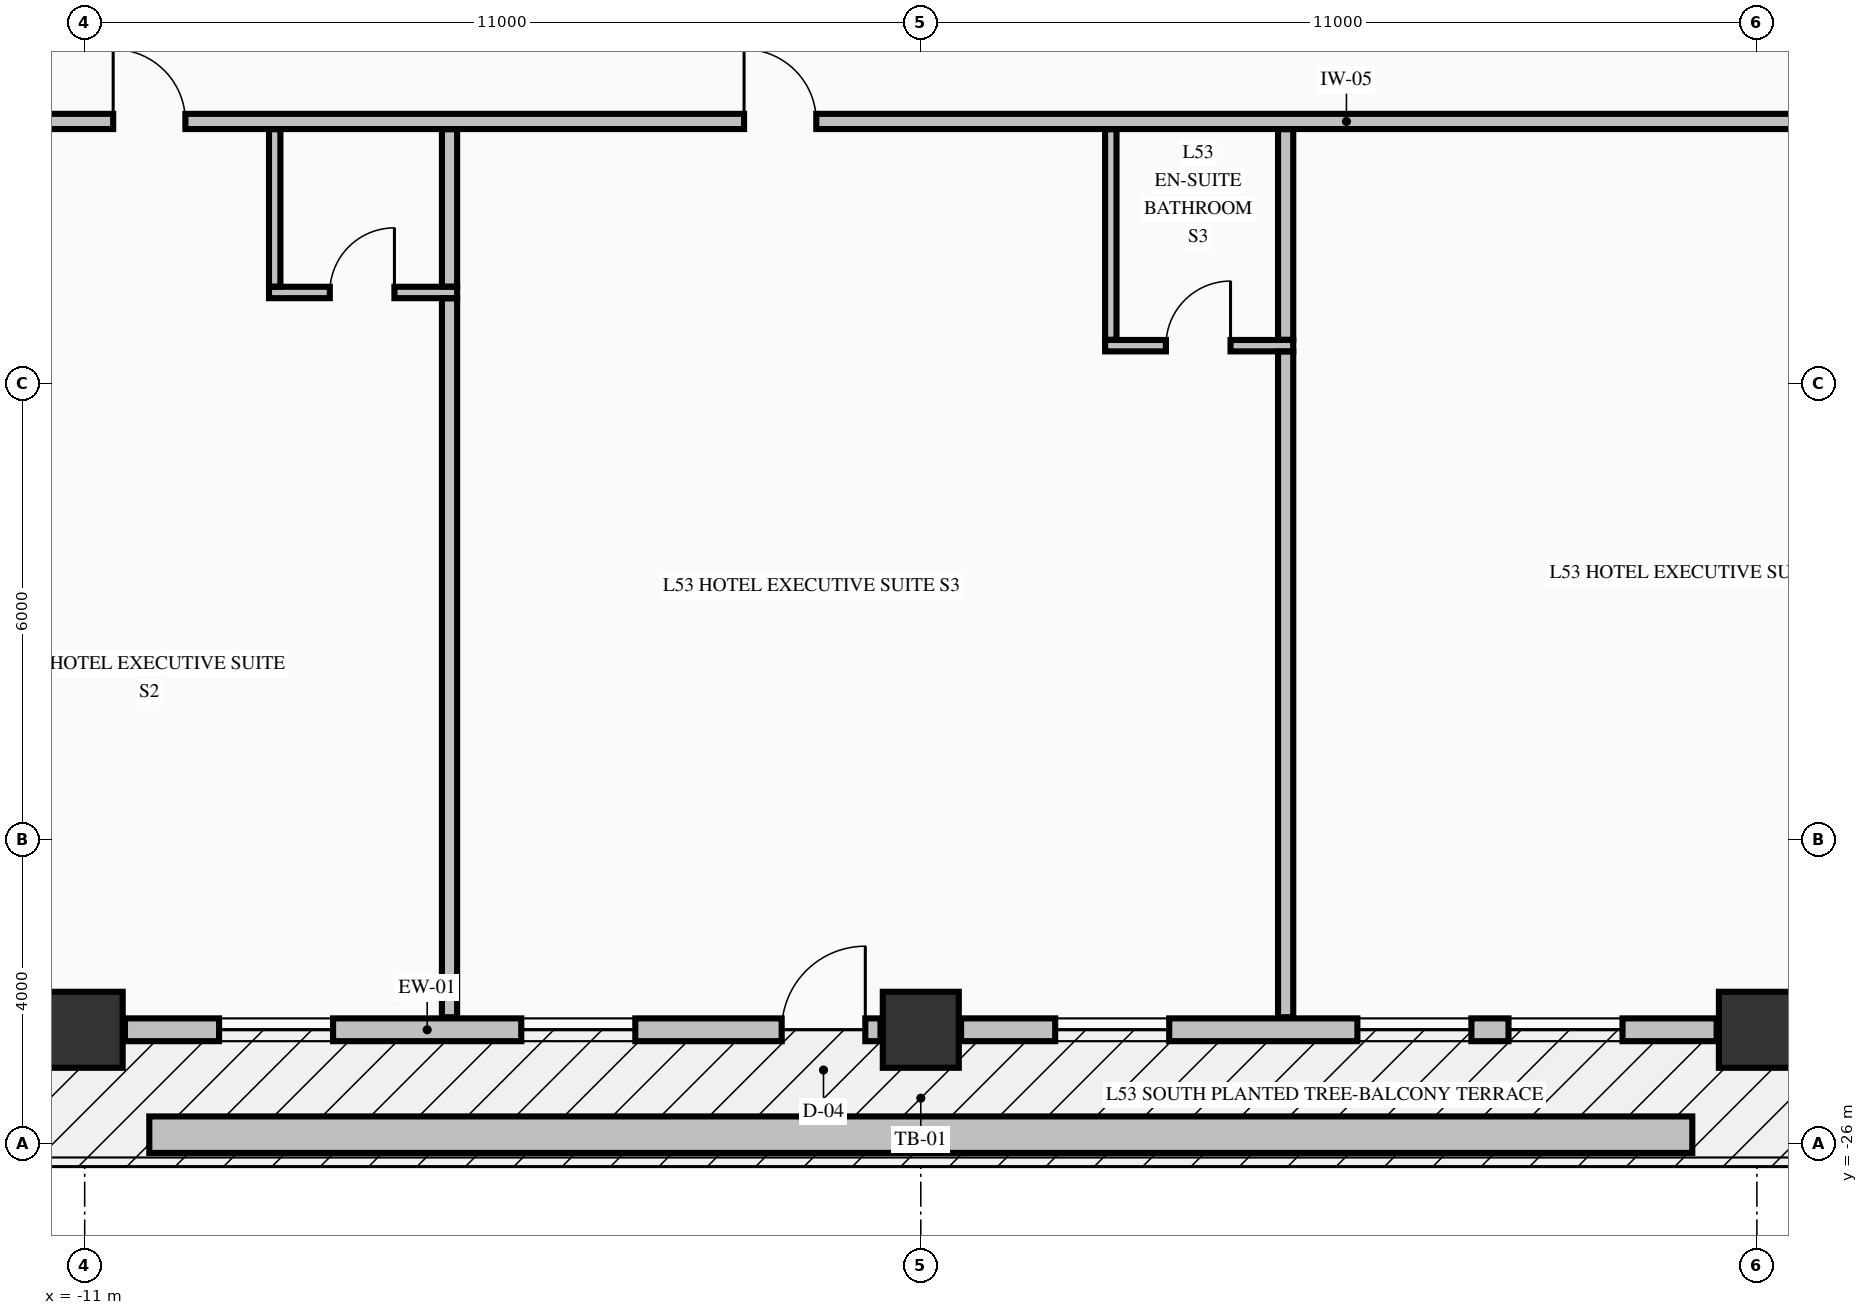
"""IFC4 building model, lengths in metres.
Left out: names, types, materials, properties, quantities, classifications, styles, units other than length and angle.
Written with IfcOpenShell. Run it as: python <this file> out.ifc"""

import sys

from ifc_helpers import new_model, si_unit, direction, frame, frame_2d, origin, origin_2d, place, context, subcontext, project, spatial, rectangle, extrude, element, fill, save


model = new_model("IFC4")
c1 = context("Model", 3, precision=1e-05, world=origin(), true_north=direction((0.0, 1.0)))
c2 = subcontext(c1, "Body", "Model", "MODEL_VIEW")
j1 = project(units=[si_unit("LENGTHUNIT", "METRE"), si_unit("PLANEANGLEUNIT", "RADIAN")], contexts=[c1])
p1 = place(None, origin())
s1 = spatial("IfcSite", under=j1, at=p1, CompositionType="ELEMENT")
p2 = place(p1, origin())
s2 = spatial("IfcBuilding", under=s1, at=p2, CompositionType="ELEMENT")
p3 = place(p2, frame((0.0, 0.0, 205.06)))
s3 = spatial("IfcBuildingStorey", under=s2, at=p3, CompositionType="ELEMENT", Elevation=205.06)
for number, where, z_axis, x_axis in (
    (1, (-11.0, -24.5, -0.25), (0.0, 0.0, 1.0), (1.0, 0.0, 0.0)),
    (2, (0.0, -24.5, -0.25), (0.0, 0.0, 1.0), (1.0, 0.0, 0.0)),
    (3, (11.0, -24.5, -0.25), (0.0, 0.0, 1.0), (1.0, 0.0, 0.0)),
):
    element("IfcColumn", number, at=place(p3, frame(where, z_axis=z_axis, x_axis=x_axis)), inside=s3, PredefinedType="COLUMN", context=c2, shape_type="SweptSolid", body=[
        extrude(rectangle(XDim=1.0, YDim=1.0, at=origin_2d()), origin(), (0.0, 0.0, 1.0), 3.4),
    ])
p4 = place(p3, frame((-10.47, -24.5, 0.0), z_axis=(0.0, 0.0, 1.0), x_axis=(1.0, 0.0, 0.0)))
e4 = element("IfcWall", 4, at=p4, inside=s3, PredefinedType="STANDARD", context=c2, shape_type="SweptSolid", body=[
    extrude(rectangle(XDim=9.94, YDim=0.3, at=frame_2d((4.97, 0.0))), origin(), (0.0, 0.0, 1.0), 2.542),
])
p5 = place(p4, frame((8.64, 0.0, 0.0)))
e5 = element("IfcOpeningElement", 5, at=p5, cuts=e4, PredefinedType="OPENING", context=c2, shape_type="SweptSolid", body=[
    extrude(rectangle(XDim=1.1, YDim=2.15, at=frame_2d((0.55, 1.075))), frame((0.0, 0.16, 0.0), z_axis=(0.0, -1.0, 0.0), x_axis=(1.0, 0.0, 0.0)), (0.0, 0.0, 1.0), 0.32),
])
p6 = place(p4, frame((1.238, 0.0, 0.72)))
e6 = element("IfcOpeningElement", 6, at=p6, cuts=e4, PredefinedType="OPENING", context=c2, shape_type="SweptSolid", body=[
    extrude(rectangle(XDim=1.5, YDim=1.6, at=frame_2d((0.75, 0.8))), frame((0.0, 0.16, 0.0), z_axis=(0.0, -1.0, 0.0), x_axis=(1.0, 0.0, 0.0)), (0.0, 0.0, 1.0), 0.32),
])
p7 = place(p4, frame((5.214, 0.0, 0.72)))
e7 = element("IfcOpeningElement", 7, at=p7, cuts=e4, PredefinedType="OPENING", context=c2, shape_type="SweptSolid", body=[
    extrude(rectangle(XDim=1.5, YDim=1.6, at=frame_2d((0.75, 0.8))), frame((0.0, 0.16, 0.0), z_axis=(0.0, -1.0, 0.0), x_axis=(1.0, 0.0, 0.0)), (0.0, 0.0, 1.0), 0.32),
])
p8 = place(p3, frame((0.53, -24.5, 0.0), z_axis=(0.0, 0.0, 1.0), x_axis=(1.0, 0.0, 0.0)))
e8 = element("IfcWall", 8, at=p8, inside=s3, PredefinedType="STANDARD", context=c2, shape_type="SweptSolid", body=[
    extrude(rectangle(XDim=9.94, YDim=0.3, at=frame_2d((4.97, 0.0))), origin(), (0.0, 0.0, 1.0), 2.542),
])
p9 = place(p8, frame((1.238, 0.0, 0.72)))
e9 = element("IfcOpeningElement", 9, at=p9, cuts=e8, PredefinedType="OPENING", context=c2, shape_type="SweptSolid", body=[
    extrude(rectangle(XDim=1.5, YDim=1.6, at=frame_2d((0.75, 0.8))), frame((0.0, 0.16, 0.0), z_axis=(0.0, -1.0, 0.0), x_axis=(1.0, 0.0, 0.0)), (0.0, 0.0, 1.0), 0.32),
])
p10 = place(p8, frame((5.214, 0.0, 0.72)))
e10 = element("IfcOpeningElement", 10, at=p10, cuts=e8, PredefinedType="OPENING", context=c2, shape_type="SweptSolid", body=[
    extrude(rectangle(XDim=1.5, YDim=1.6, at=frame_2d((0.75, 0.8))), frame((0.0, 0.16, 0.0), z_axis=(0.0, -1.0, 0.0), x_axis=(1.0, 0.0, 0.0)), (0.0, 0.0, 1.0), 0.32),
])
p11 = place(p8, frame((7.202, 0.0, 0.72)))
e11 = element("IfcOpeningElement", 11, at=p11, cuts=e8, PredefinedType="OPENING", context=c2, shape_type="SweptSolid", body=[
    extrude(rectangle(XDim=1.5, YDim=1.6, at=frame_2d((0.75, 0.8))), frame((0.0, 0.16, 0.0), z_axis=(0.0, -1.0, 0.0), x_axis=(1.0, 0.0, 0.0)), (0.0, 0.0, 1.0), 0.32),
])
p12 = place(p3, frame((2.425, -15.5, 0.0), z_axis=(0.0, 0.0, 1.0), x_axis=(1.0, 0.0, 0.0)))
e12 = element("IfcWall", 12, at=p12, inside=s3, PredefinedType="PARTITIONING", context=c2, shape_type="SweptSolid", body=[
    extrude(rectangle(XDim=2.475, YDim=0.15, at=frame_2d((1.237, 0.0))), origin(), (0.0, 0.0, 1.0), 3.15),
])
p13 = place(p12, frame((0.8, 0.0, 0.0)))
e13 = element("IfcOpeningElement", 13, at=p13, cuts=e12, PredefinedType="OPENING", context=c2, shape_type="SweptSolid", body=[
    extrude(rectangle(XDim=0.85, YDim=2.1, at=frame_2d((0.425, 1.05))), frame((0.0, 0.085, 0.0), z_axis=(0.0, -1.0, 0.0), x_axis=(1.0, 0.0, 0.0)), (0.0, 0.0, 1.0), 0.17),
])
p14 = place(p3, frame((-8.575, -14.8, 0.0), z_axis=(0.0, 0.0, 1.0), x_axis=(1.0, 0.0, 0.0)))
e14 = element("IfcWall", 14, at=p14, inside=s3, PredefinedType="PARTITIONING", context=c2, shape_type="SweptSolid", body=[
    extrude(rectangle(XDim=2.475, YDim=0.15, at=frame_2d((1.237, 0.0))), origin(), (0.0, 0.0, 1.0), 3.15),
])
p15 = place(p14, frame((0.8, 0.0, 0.0)))
e15 = element("IfcOpeningElement", 15, at=p15, cuts=e14, PredefinedType="OPENING", context=c2, shape_type="SweptSolid", body=[
    extrude(rectangle(XDim=0.85, YDim=2.1, at=frame_2d((0.425, 1.05))), frame((0.0, 0.085, 0.0), z_axis=(0.0, -1.0, 0.0), x_axis=(1.0, 0.0, 0.0)), (0.0, 0.0, 1.0), 0.17),
])
p16 = place(p3, frame((-22.1, -12.55, 0.0), z_axis=(0.0, 0.0, 1.0), x_axis=(1.0, 0.0, 0.0)))
e16 = element("IfcWall", 16, at=p16, inside=s3, PredefinedType="PARTITIONING", context=c2, shape_type="SweptSolid", body=[
    extrude(rectangle(XDim=39.2, YDim=0.2, at=frame_2d((19.6, 0.0))), origin(), (0.0, 0.0, 1.0), 3.15),
])
p17 = place(p16, frame((3.525, 0.0, 0.0)))
e17 = element("IfcOpeningElement", 17, at=p17, cuts=e16, PredefinedType="OPENING", context=c2, shape_type="SweptSolid", body=[
    extrude(rectangle(XDim=0.95, YDim=2.15, at=frame_2d((0.475, 1.075))), frame((0.0, 0.11, 0.0), z_axis=(0.0, -1.0, 0.0), x_axis=(1.0, 0.0, 0.0)), (0.0, 0.0, 1.0), 0.22),
])
p18 = place(p16, frame((11.475, 0.0, 0.0)))
e18 = element("IfcOpeningElement", 18, at=p18, cuts=e16, PredefinedType="OPENING", context=c2, shape_type="SweptSolid", body=[
    extrude(rectangle(XDim=0.95, YDim=2.15, at=frame_2d((0.475, 1.075))), frame((0.0, 0.11, 0.0), z_axis=(0.0, -1.0, 0.0), x_axis=(1.0, 0.0, 0.0)), (0.0, 0.0, 1.0), 0.22),
])
p19 = place(p16, frame((19.775, 0.0, 0.0)))
e19 = element("IfcOpeningElement", 19, at=p19, cuts=e16, PredefinedType="OPENING", context=c2, shape_type="SweptSolid", body=[
    extrude(rectangle(XDim=0.95, YDim=2.15, at=frame_2d((0.475, 1.075))), frame((0.0, 0.11, 0.0), z_axis=(0.0, -1.0, 0.0), x_axis=(1.0, 0.0, 0.0)), (0.0, 0.0, 1.0), 0.22),
])
p20 = place(p16, frame((34.675, 0.0, 0.0)))
e20 = element("IfcOpeningElement", 20, at=p20, cuts=e16, PredefinedType="OPENING", context=c2, shape_type="SweptSolid", body=[
    extrude(rectangle(XDim=0.95, YDim=2.15, at=frame_2d((0.475, 1.075))), frame((0.0, 0.11, 0.0), z_axis=(0.0, -1.0, 0.0), x_axis=(1.0, 0.0, 0.0)), (0.0, 0.0, 1.0), 0.22),
])
p21 = place(p3, frame((-8.5, -14.722, 0.0), z_axis=(0.0, 0.0, 1.0), x_axis=(0.0, 1.0, 0.0)))
e21 = element("IfcWall", 21, at=p21, inside=s3, PredefinedType="PARTITIONING", context=c2, shape_type="SweptSolid", body=[
    extrude(rectangle(XDim=2.069, YDim=0.15, at=frame_2d((1.034, 0.0))), origin(), (0.0, 0.0, 1.0), 3.15),
])
p22 = place(p3, frame((-6.2, -24.335, 0.0), z_axis=(0.0, 0.0, 1.0), x_axis=(0.0, 1.0, 0.0)))
e22 = element("IfcWall", 22, at=p22, inside=s3, PredefinedType="PARTITIONING", context=c2, shape_type="SweptSolid", body=[
    extrude(rectangle(XDim=9.457, YDim=0.2, at=frame_2d((4.729, 0.0))), origin(), (0.0, 0.0, 1.0), 3.15),
])
p23 = place(p3, frame((-6.2, -14.722, 0.0), z_axis=(0.0, 0.0, 1.0), x_axis=(0.0, 1.0, 0.0)))
e23 = element("IfcWall", 23, at=p23, inside=s3, PredefinedType="PARTITIONING", context=c2, shape_type="SweptSolid", body=[
    extrude(rectangle(XDim=2.069, YDim=0.2, at=frame_2d((1.034, 0.0))), origin(), (0.0, 0.0, 1.0), 3.15),
])
p24 = place(p3, frame((2.5, -15.422, 0.0), z_axis=(0.0, 0.0, 1.0), x_axis=(0.0, 1.0, 0.0)))
e24 = element("IfcWall", 24, at=p24, inside=s3, PredefinedType="PARTITIONING", context=c2, shape_type="SweptSolid", body=[
    extrude(rectangle(XDim=2.769, YDim=0.15, at=frame_2d((1.385, 0.0))), origin(), (0.0, 0.0, 1.0), 3.15),
])
p25 = place(p3, frame((4.8, -24.335, 0.0), z_axis=(0.0, 0.0, 1.0), x_axis=(0.0, 1.0, 0.0)))
e25 = element("IfcWall", 25, at=p25, inside=s3, PredefinedType="PARTITIONING", context=c2, shape_type="SweptSolid", body=[
    extrude(rectangle(XDim=8.757, YDim=0.2, at=frame_2d((4.378, 0.0))), origin(), (0.0, 0.0, 1.0), 3.15),
])
p26 = place(p3, frame((4.8, -15.422, 0.0), z_axis=(0.0, 0.0, 1.0), x_axis=(0.0, 1.0, 0.0)))
e26 = element("IfcWall", 26, at=p26, inside=s3, PredefinedType="PARTITIONING", context=c2, shape_type="SweptSolid", body=[
    extrude(rectangle(XDim=2.769, YDim=0.2, at=frame_2d((1.385, 0.0))), origin(), (0.0, 0.0, 1.0), 3.15),
])
p27 = place(p3, frame((-10.15, -25.88, -0.04), z_axis=(0.0, 0.0, 1.0), x_axis=(1.0, 0.0, 0.0)))
e27 = element("IfcWall", 27, at=p27, inside=s3, PredefinedType="PARAPET", context=c2, shape_type="SweptSolid", body=[
    extrude(rectangle(XDim=20.3, YDim=0.48, at=frame_2d((10.15, 0.0))), origin(), (0.0, 0.0, 1.0), 0.52),
])
p28 = place(p5, origin())
e28 = element("IfcDoor", 28, at=p28, inside=s3, OperationType="SINGLE_SWING_RIGHT", PredefinedType="DOOR", context=c2, shape_type="SweptSolid", body=[
    extrude(rectangle(XDim=1.1, YDim=2.15, at=frame_2d((0.55, 1.075))), frame((0.0, 0.025, 0.0), z_axis=(0.0, -1.0, 0.0), x_axis=(1.0, 0.0, 0.0)), (0.0, 0.0, 1.0), 0.05),
])
fill(e5, e28)
p29 = place(p6, origin())
e29 = element("IfcWindow", 29, at=p29, inside=s3, PartitioningType="SINGLE_PANEL", PredefinedType="WINDOW", context=c2, shape_type="SweptSolid", body=[
    extrude(rectangle(XDim=1.5, YDim=1.6, at=frame_2d((0.75, 0.8))), frame((0.0, 0.03, 0.0), z_axis=(0.0, -1.0, 0.0), x_axis=(1.0, 0.0, 0.0)), (0.0, 0.0, 1.0), 0.06),
])
fill(e6, e29)
p30 = place(p7, origin())
e30 = element("IfcWindow", 30, at=p30, inside=s3, PartitioningType="SINGLE_PANEL", PredefinedType="WINDOW", context=c2, shape_type="SweptSolid", body=[
    extrude(rectangle(XDim=1.5, YDim=1.6, at=frame_2d((0.75, 0.8))), frame((0.0, 0.03, 0.0), z_axis=(0.0, -1.0, 0.0), x_axis=(1.0, 0.0, 0.0)), (0.0, 0.0, 1.0), 0.06),
])
fill(e7, e30)
p31 = place(p9, origin())
e31 = element("IfcWindow", 31, at=p31, inside=s3, PartitioningType="SINGLE_PANEL", PredefinedType="WINDOW", context=c2, shape_type="SweptSolid", body=[
    extrude(rectangle(XDim=1.5, YDim=1.6, at=frame_2d((0.75, 0.8))), frame((0.0, 0.03, 0.0), z_axis=(0.0, -1.0, 0.0), x_axis=(1.0, 0.0, 0.0)), (0.0, 0.0, 1.0), 0.06),
])
fill(e9, e31)
p32 = place(p10, origin())
e32 = element("IfcWindow", 32, at=p32, inside=s3, PartitioningType="SINGLE_PANEL", PredefinedType="WINDOW", context=c2, shape_type="SweptSolid", body=[
    extrude(rectangle(XDim=1.5, YDim=1.6, at=frame_2d((0.75, 0.8))), frame((0.0, 0.03, 0.0), z_axis=(0.0, -1.0, 0.0), x_axis=(1.0, 0.0, 0.0)), (0.0, 0.0, 1.0), 0.06),
])
fill(e10, e32)
p33 = place(p11, origin())
e33 = element("IfcWindow", 33, at=p33, inside=s3, PartitioningType="SINGLE_PANEL", PredefinedType="WINDOW", context=c2, shape_type="SweptSolid", body=[
    extrude(rectangle(XDim=1.5, YDim=1.6, at=frame_2d((0.75, 0.8))), frame((0.0, 0.03, 0.0), z_axis=(0.0, -1.0, 0.0), x_axis=(1.0, 0.0, 0.0)), (0.0, 0.0, 1.0), 0.06),
])
fill(e11, e33)
p34 = place(p18, origin())
e34 = element("IfcDoor", 34, at=p34, inside=s3, OperationType="SINGLE_SWING_LEFT", PredefinedType="DOOR", context=c2, shape_type="SweptSolid", body=[
    extrude(rectangle(XDim=0.95, YDim=2.15, at=frame_2d((0.475, 1.075))), frame((0.0, 0.025, 0.0), z_axis=(0.0, -1.0, 0.0), x_axis=(1.0, 0.0, 0.0)), (0.0, 0.0, 1.0), 0.05),
])
fill(e18, e34)
p35 = place(p15, origin())
e35 = element("IfcDoor", 35, at=p35, inside=s3, OperationType="SINGLE_SWING_RIGHT", PredefinedType="DOOR", context=c2, shape_type="SweptSolid", body=[
    extrude(rectangle(XDim=0.85, YDim=2.1, at=frame_2d((0.425, 1.05))), frame((0.0, 0.025, 0.0), z_axis=(0.0, -1.0, 0.0), x_axis=(1.0, 0.0, 0.0)), (0.0, 0.0, 1.0), 0.05),
])
fill(e15, e35)
p36 = place(p19, origin())
e36 = element("IfcDoor", 36, at=p36, inside=s3, OperationType="SINGLE_SWING_LEFT", PredefinedType="DOOR", context=c2, shape_type="SweptSolid", body=[
    extrude(rectangle(XDim=0.95, YDim=2.15, at=frame_2d((0.475, 1.075))), frame((0.0, 0.025, 0.0), z_axis=(0.0, -1.0, 0.0), x_axis=(1.0, 0.0, 0.0)), (0.0, 0.0, 1.0), 0.05),
])
fill(e19, e36)
p37 = place(p13, origin())
e37 = element("IfcDoor", 37, at=p37, inside=s3, OperationType="SINGLE_SWING_RIGHT", PredefinedType="DOOR", context=c2, shape_type="SweptSolid", body=[
    extrude(rectangle(XDim=0.85, YDim=2.1, at=frame_2d((0.425, 1.05))), frame((0.0, 0.025, 0.0), z_axis=(0.0, -1.0, 0.0), x_axis=(1.0, 0.0, 0.0)), (0.0, 0.0, 1.0), 0.05),
])
fill(e13, e37)
save(model, sys.argv[1])
